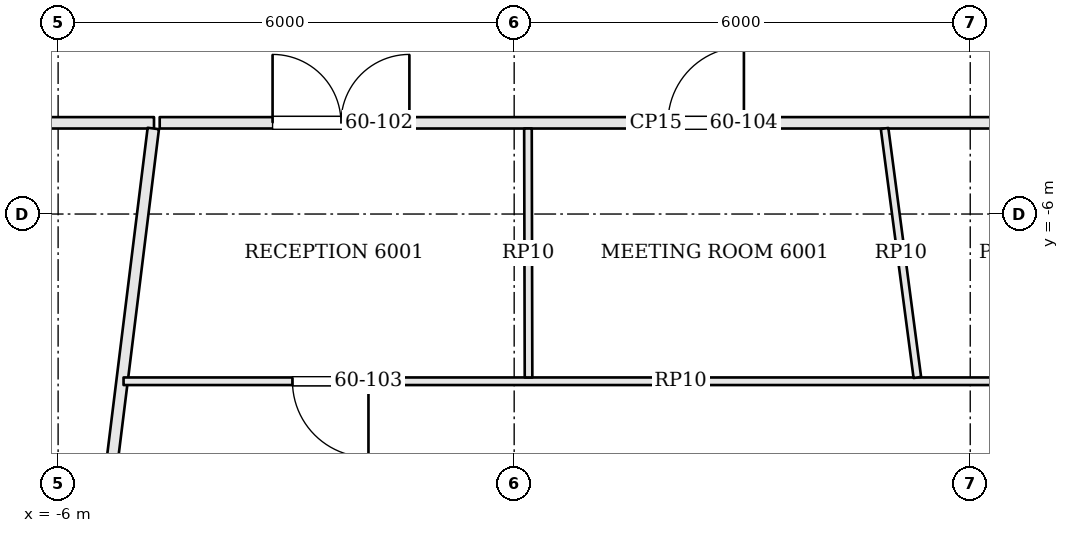
"""IFC4 building model, lengths in metres.
Left out: names, types, materials, properties, quantities, classifications, styles, units other than length and angle.
Written with IfcOpenShell. Run it as: python <this file> out.ifc"""

import sys

from ifc_helpers import new_model, si_unit, direction, frame, frame_2d, origin, place, context, subcontext, project, spatial, rectangle, extrude, element, fill, save


model = new_model("IFC4")
c1 = context("Model", 3, precision=1e-05, world=origin(), true_north=direction((0.0, 1.0)))
c2 = subcontext(c1, "Body", "Model", "MODEL_VIEW")
j1 = project(units=[si_unit("LENGTHUNIT", "METRE"), si_unit("PLANEANGLEUNIT", "RADIAN")], contexts=[c1])
p1 = place(None, origin())
s1 = spatial("IfcSite", under=j1, at=p1, CompositionType="ELEMENT")
p2 = place(p1, origin())
s2 = spatial("IfcBuilding", under=s1, at=p2, CompositionType="ELEMENT")
p3 = place(p2, frame((0.0, 0.0, 244.8)))
s3 = spatial("IfcBuildingStorey", under=s2, at=p3, CompositionType="ELEMENT", Elevation=244.8)
p4 = place(p3, frame((-14.725, -4.8, 0.0), z_axis=(0.0, 0.0, 1.0), x_axis=(1.0, 0.0, 0.0)))
e1 = element("IfcWall", 1, at=p4, inside=s3, PredefinedType="PARTITIONING", context=c2, shape_type="SweptSolid", body=[
    extrude(rectangle(XDim=9.987, YDim=0.15, at=frame_2d((4.993, 0.0))), origin(), (0.0, 0.0, 1.0), 3.084),
])
p5 = place(p4, frame((3.484, 0.0, 0.0)))
e2 = element("IfcOpeningElement", 2, at=p5, cuts=e1, PredefinedType="OPENING", context=c2, shape_type="SweptSolid", body=[
    extrude(rectangle(XDim=1.8, YDim=2.1, at=frame_2d((0.9, 1.05))), frame((0.0, 0.085, 0.0), z_axis=(0.0, -1.0, 0.0), x_axis=(1.0, 0.0, 0.0)), (0.0, 0.0, 1.0), 0.17),
])
p6 = place(p3, frame((-6.493, -18.982, 0.0), z_axis=(0.0, 0.0, 1.0), x_axis=(0.122779061943, 0.992434029016, 0.0)))
e3 = element("IfcWall", 3, at=p6, inside=s3, PredefinedType="PARTITIONING", context=c2, shape_type="SweptSolid", body=[
    extrude(rectangle(XDim=14.216, YDim=0.15, at=frame_2d((7.108, 0.0))), origin(), (0.0, 0.0, 1.0), 3.084),
])
p7 = place(p3, frame((-4.664, -4.8, 0.0), z_axis=(0.0, 0.0, 1.0), x_axis=(1.0, 0.0, 0.0)))
e4 = element("IfcWall", 4, at=p7, inside=s3, PredefinedType="PARTITIONING", context=c2, shape_type="SweptSolid", body=[
    extrude(rectangle(XDim=13.058, YDim=0.15, at=frame_2d((6.529, 0.0))), origin(), (0.0, 0.0, 1.0), 3.084),
])
p8 = place(p7, frame((1.485, 0.0, 0.0)))
e5 = element("IfcOpeningElement", 5, at=p8, cuts=e4, PredefinedType="OPENING", context=c2, shape_type="SweptSolid", body=[
    extrude(rectangle(XDim=1.8, YDim=2.1, at=frame_2d((0.9, 1.05))), frame((0.0, 0.085, 0.0), z_axis=(0.0, -1.0, 0.0), x_axis=(1.0, 0.0, 0.0)), (0.0, 0.0, 1.0), 0.17),
])
p9 = place(p7, frame((6.686, 0.0, 0.0)))
e6 = element("IfcOpeningElement", 6, at=p9, cuts=e4, PredefinedType="OPENING", context=c2, shape_type="SweptSolid", body=[
    extrude(rectangle(XDim=1.0, YDim=2.4, at=frame_2d((0.5, 1.2))), frame((0.0, 0.085, 0.0), z_axis=(0.0, -1.0, 0.0), x_axis=(1.0, 0.0, 0.0)), (0.0, 0.0, 1.0), 0.17),
])
p10 = place(p3, frame((9.518, -8.2, 0.0), z_axis=(0.0, 0.0, 1.0), x_axis=(-1.0, 0.0, 0.0)))
e7 = element("IfcWall", 7, at=p10, inside=s3, PredefinedType="PARTITIONING", context=c2, shape_type="SweptSolid", body=[
    extrude(rectangle(XDim=14.657, YDim=0.1, at=frame_2d((7.329, 0.0))), origin(), (0.0, 0.0, 1.0), 3.084),
])
p11 = place(p10, frame((11.435, 0.0, 0.0)))
e8 = element("IfcOpeningElement", 8, at=p11, cuts=e7, PredefinedType="OPENING", context=c2, shape_type="SweptSolid", body=[
    extrude(rectangle(XDim=1.0, YDim=2.1, at=frame_2d((0.5, 1.05))), frame((0.0, 0.06, 0.0), z_axis=(0.0, -1.0, 0.0), x_axis=(1.0, 0.0, 0.0)), (0.0, 0.0, 1.0), 0.12),
])
p12 = place(p10, frame((1.514, 0.0, 0.0)))
e9 = element("IfcOpeningElement", 9, at=p12, cuts=e7, PredefinedType="OPENING", context=c2, shape_type="SweptSolid", body=[
    extrude(rectangle(XDim=0.9, YDim=2.1, at=frame_2d((0.45, 1.05))), frame((0.0, 0.06, 0.0), z_axis=(0.0, -1.0, 0.0), x_axis=(1.0, 0.0, 0.0)), (0.0, 0.0, 1.0), 0.12),
])
p13 = place(p3, frame((0.181, -4.875, 0.0), z_axis=(0.0, 0.0, 1.0), x_axis=(0.002311012168, -0.999997329608, 0.0)))
e10 = element("IfcWall", 10, at=p13, inside=s3, PredefinedType="PARTITIONING", context=c2, shape_type="SweptSolid", body=[
    extrude(rectangle(XDim=3.275, YDim=0.1, at=frame_2d((1.637, 0.0))), origin(), (0.0, 0.0, 1.0), 3.084),
])
p14 = place(p3, frame((4.873, -4.875, 0.0), z_axis=(0.0, 0.0, 1.0), x_axis=(0.13048891715, -0.991449768017, 0.0)))
e11 = element("IfcWall", 11, at=p14, inside=s3, PredefinedType="PARTITIONING", context=c2, shape_type="SweptSolid", body=[
    extrude(rectangle(XDim=3.304, YDim=0.1, at=frame_2d((1.652, 0.0))), origin(), (0.0, 0.0, 1.0), 3.084),
])
p15 = place(p8, origin())
e12 = element("IfcDoor", 12, at=p15, inside=s3, OperationType="DOUBLE_DOOR_SINGLE_SWING", PredefinedType="DOOR", context=c2, shape_type="SweptSolid", body=[
    extrude(rectangle(XDim=1.8, YDim=2.1, at=frame_2d((0.9, 1.05))), frame((0.0, 0.025, 0.0), z_axis=(0.0, -1.0, 0.0), x_axis=(1.0, 0.0, 0.0)), (0.0, 0.0, 1.0), 0.05),
])
fill(e5, e12)
p16 = place(p11, origin())
e13 = element("IfcDoor", 13, at=p16, inside=s3, OperationType="SINGLE_SWING_LEFT", PredefinedType="DOOR", context=c2, shape_type="SweptSolid", body=[
    extrude(rectangle(XDim=1.0, YDim=2.1, at=frame_2d((0.5, 1.05))), frame((0.0, 0.025, 0.0), z_axis=(0.0, -1.0, 0.0), x_axis=(1.0, 0.0, 0.0)), (0.0, 0.0, 1.0), 0.05),
])
fill(e8, e13)
p17 = place(p9, origin())
e14 = element("IfcDoor", 14, at=p17, inside=s3, OperationType="SINGLE_SWING_RIGHT", PredefinedType="DOOR", context=c2, shape_type="SweptSolid", body=[
    extrude(rectangle(XDim=1.0, YDim=2.4, at=frame_2d((0.5, 1.2))), frame((0.0, 0.025, 0.0), z_axis=(0.0, -1.0, 0.0), x_axis=(1.0, 0.0, 0.0)), (0.0, 0.0, 1.0), 0.05),
])
fill(e6, e14)
save(model, sys.argv[1])
